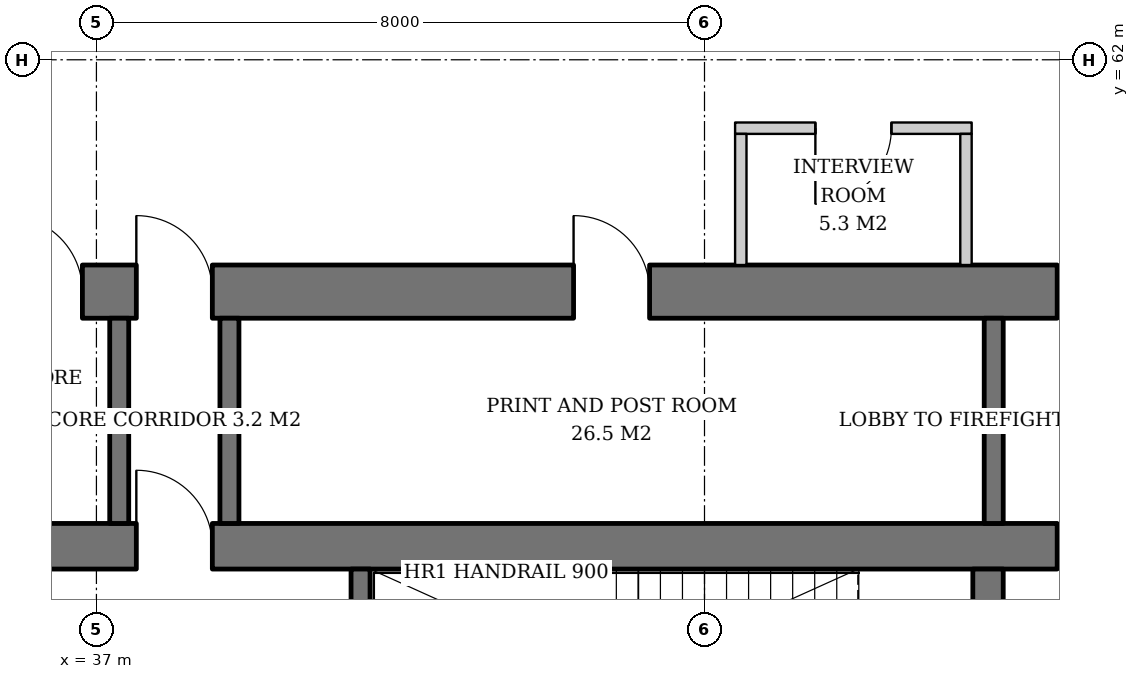
"""IFC4 building model, lengths in metres.
Left out: names, types, materials, properties, quantities, classifications, styles, units other than length and angle.
Written with IfcOpenShell. Run it as: python <this file> out.ifc"""

import sys

from ifc_helpers import new_model, si_unit, direction, frame, frame_2d, origin, place, context, subcontext, project, spatial, rectangle, extrude, element, fill, save


model = new_model("IFC4")
c1 = context("Model", 3, precision=1e-05, world=origin(), true_north=direction((0.0, 1.0)))
c2 = subcontext(c1, "Body", "Model", "MODEL_VIEW")
j1 = project(units=[si_unit("LENGTHUNIT", "METRE"), si_unit("PLANEANGLEUNIT", "RADIAN")], contexts=[c1])
p1 = place(None, origin())
s1 = spatial("IfcSite", under=j1, at=p1, CompositionType="ELEMENT")
p2 = place(p1, origin())
s2 = spatial("IfcBuilding", under=s1, at=p2, CompositionType="ELEMENT")
p3 = place(p2, frame((0.0, 0.0, 108.4)))
s3 = spatial("IfcBuildingStorey", under=s2, at=p3, CompositionType="ELEMENT", Elevation=108.4)
p4 = place(p3, frame((35.1, 55.6, 0.0), z_axis=(0.0, 0.0, 1.0), x_axis=(1.0, 0.0, 0.0)))
e1 = element("IfcWall", 1, at=p4, inside=s3, PredefinedType="SHEAR", context=c2, shape_type="SweptSolid", body=[
    extrude(rectangle(XDim=19.8, YDim=0.6, at=frame_2d((9.9, 0.0))), origin(), (0.0, 0.0, 1.0), 3.8),
])
p5 = place(p4, frame((14.54, 0.0, 0.0)))
e2 = element("IfcOpeningElement", 2, at=p5, cuts=e1, PredefinedType="OPENING", context=c2, shape_type="SweptSolid", body=[
    extrude(rectangle(XDim=1.0, YDim=2.1, at=frame_2d((0.5, 1.05))), frame((0.0, 0.31, 0.0), z_axis=(0.0, -1.0, 0.0), x_axis=(1.0, 0.0, 0.0)), (0.0, 0.0, 1.0), 0.62),
])
p6 = place(p4, frame((2.425, 0.0, 0.0)))
e3 = element("IfcOpeningElement", 3, at=p6, cuts=e1, PredefinedType="OPENING", context=c2, shape_type="SweptSolid", body=[
    extrude(rectangle(XDim=1.0, YDim=2.1, at=frame_2d((0.5, 1.05))), frame((0.0, 0.31, 0.0), z_axis=(0.0, -1.0, 0.0), x_axis=(1.0, 0.0, 0.0)), (0.0, 0.0, 1.0), 0.62),
])
p7 = place(p3, frame((31.7, 58.95, 0.0), z_axis=(0.0, 0.0, 1.0), x_axis=(1.0, 0.0, 0.0)))
e4 = element("IfcWall", 4, at=p7, inside=s3, PredefinedType="SHEAR", context=c2, shape_type="SweptSolid", body=[
    extrude(rectangle(XDim=26.6, YDim=0.7, at=frame_2d((13.3, 0.0))), origin(), (0.0, 0.0, 1.0), 3.8),
])
p8 = place(p7, frame((17.94, 0.0, 0.0)))
e5 = element("IfcOpeningElement", 5, at=p8, cuts=e4, PredefinedType="OPENING", context=c2, shape_type="SweptSolid", body=[
    extrude(rectangle(XDim=1.0, YDim=2.1, at=frame_2d((0.5, 1.05))), frame((0.0, 0.36, 0.0), z_axis=(0.0, -1.0, 0.0), x_axis=(1.0, 0.0, 0.0)), (0.0, 0.0, 1.0), 0.72),
])
p9 = place(p7, frame((5.825, 0.0, 0.0)))
e6 = element("IfcOpeningElement", 6, at=p9, cuts=e4, PredefinedType="OPENING", context=c2, shape_type="SweptSolid", body=[
    extrude(rectangle(XDim=1.0, YDim=2.1, at=frame_2d((0.5, 1.05))), frame((0.0, 0.36, 0.0), z_axis=(0.0, -1.0, 0.0), x_axis=(1.0, 0.0, 0.0)), (0.0, 0.0, 1.0), 0.72),
])
p10 = place(p7, frame((1.85, 0.0, 0.0)))
e7 = element("IfcOpeningElement", 7, at=p10, cuts=e4, PredefinedType="OPENING", context=c2, shape_type="SweptSolid", body=[
    extrude(rectangle(XDim=1.0, YDim=2.1, at=frame_2d((0.5, 1.05))), frame((0.0, 0.36, 0.0), z_axis=(0.0, -1.0, 0.0), x_axis=(1.0, 0.0, 0.0)), (0.0, 0.0, 1.0), 0.72),
])
p11 = place(p7, frame((4.115, 0.0, 0.0)))
e8 = element("IfcOpeningElement", 8, at=p11, cuts=e4, PredefinedType="OPENING", context=c2, shape_type="SweptSolid", body=[
    extrude(rectangle(XDim=1.0, YDim=2.1, at=frame_2d((0.5, 1.05))), frame((0.0, 0.36, 0.0), z_axis=(0.0, -1.0, 0.0), x_axis=(1.0, 0.0, 0.0)), (0.0, 0.0, 1.0), 0.72),
])
p12 = place(p7, frame((11.577, 0.0, 0.0)))
e9 = element("IfcOpeningElement", 9, at=p12, cuts=e4, PredefinedType="OPENING", context=c2, shape_type="SweptSolid", body=[
    extrude(rectangle(XDim=1.0, YDim=2.1, at=frame_2d((0.5, 1.05))), frame((0.0, 0.36, 0.0), z_axis=(0.0, -1.0, 0.0), x_axis=(1.0, 0.0, 0.0)), (0.0, 0.0, 1.0), 0.72),
])
p13 = place(p7, frame((20.9, 0.0, 0.0)))
e10 = element("IfcOpeningElement", 10, at=p13, cuts=e4, PredefinedType="OPENING", context=c2, shape_type="SweptSolid", body=[
    extrude(rectangle(XDim=1.0, YDim=2.1, at=frame_2d((0.5, 1.05))), frame((0.0, 0.36, 0.0), z_axis=(0.0, -1.0, 0.0), x_axis=(1.0, 0.0, 0.0)), (0.0, 0.0, 1.0), 0.72),
])
p14 = place(p7, frame((23.75, 0.0, 0.0)))
e11 = element("IfcOpeningElement", 11, at=p14, cuts=e4, PredefinedType="OPENING", context=c2, shape_type="SweptSolid", body=[
    extrude(rectangle(XDim=1.0, YDim=2.1, at=frame_2d((0.5, 1.05))), frame((0.0, 0.36, 0.0), z_axis=(0.0, -1.0, 0.0), x_axis=(1.0, 0.0, 0.0)), (0.0, 0.0, 1.0), 0.72),
])
p15 = place(p3, frame((48.73, 52.4, 0.0), z_axis=(0.0, 0.0, 1.0), x_axis=(0.0, 1.0, 0.0)))
e12 = element("IfcWall", 12, at=p15, inside=s3, PredefinedType="SHEAR", context=c2, shape_type="SweptSolid", body=[
    extrude(rectangle(XDim=2.9, YDim=0.4, at=frame_2d((1.45, 0.0))), origin(), (0.0, 0.0, 1.0), 3.8),
])
p16 = place(p15, frame((0.3, 0.0, 0.0)))
e13 = element("IfcOpeningElement", 13, at=p16, cuts=e12, PredefinedType="OPENING", context=c2, shape_type="SweptSolid", body=[
    extrude(rectangle(XDim=1.0, YDim=2.1, at=frame_2d((0.5, 1.05))), frame((0.0, 0.21, 0.0), z_axis=(0.0, -1.0, 0.0), x_axis=(1.0, 0.0, 0.0)), (0.0, 0.0, 1.0), 0.42),
])
p17 = place(p3, frame((40.475, 52.4, 0.0), z_axis=(0.0, 0.0, 1.0), x_axis=(0.0, 1.0, 0.0)))
e14 = element("IfcWall", 14, at=p17, inside=s3, PredefinedType="SHEAR", context=c2, shape_type="SweptSolid", body=[
    extrude(rectangle(XDim=2.9, YDim=0.25, at=frame_2d((1.45, 0.0))), origin(), (0.0, 0.0, 1.0), 3.8),
])
for number, where, z_axis, x_axis in (
    (15, (48.805, 55.9, 0.0), (0.0, 0.0, 1.0), (0.0, 1.0, 0.0)),
    (16, (37.3, 55.9, 0.0), (0.0, 0.0, 1.0), (0.0, 1.0, 0.0)),
    (17, (38.75, 55.9, 0.0), (0.0, 0.0, 1.0), (0.0, 1.0, 0.0)),
):
    element("IfcWall", number, at=place(p3, frame(where, z_axis=z_axis, x_axis=x_axis)), inside=s3, PredefinedType="SOLIDWALL", context=c2, shape_type="SweptSolid", body=[
        extrude(rectangle(XDim=2.7, YDim=0.25, at=frame_2d((1.35, 0.0))), origin(), (0.0, 0.0, 1.0), 3.62),
    ])
p18 = place(p3, frame((48.515, 61.1, 0.0), z_axis=(0.0, 0.0, 1.0), x_axis=(-1.0, 0.0, 0.0)))
e18 = element("IfcWall", 18, at=p18, inside=s3, PredefinedType="PARTITIONING", context=c2, shape_type="SweptSolid", body=[
    extrude(rectangle(XDim=3.112, YDim=0.15, at=frame_2d((1.556, 0.0))), origin(), (0.0, 0.0, 1.0), 3.62),
])
p19 = place(p18, frame((1.056, 0.0, 0.0)))
e19 = element("IfcOpeningElement", 19, at=p19, cuts=e18, PredefinedType="OPENING", context=c2, shape_type="SweptSolid", body=[
    extrude(rectangle(XDim=1.0, YDim=2.1, at=frame_2d((0.5, 1.05))), frame((0.0, 0.085, 0.0), z_axis=(0.0, -1.0, 0.0), x_axis=(1.0, 0.0, 0.0)), (0.0, 0.0, 1.0), 0.17),
])
for number, where, z_axis, x_axis in (
    (20, (48.44, 59.3, 0.0), (0.0, 0.0, 1.0), (0.0, 1.0, 0.0)),
    (21, (45.478, 59.3, 0.0), (0.0, 0.0, 1.0), (0.0, 1.0, 0.0)),
):
    element("IfcWall", number, at=place(p3, frame(where, z_axis=z_axis, x_axis=x_axis)), inside=s3, PredefinedType="PARTITIONING", context=c2, shape_type="SweptSolid", body=[
        extrude(rectangle(XDim=1.725, YDim=0.15, at=frame_2d((0.862, 0.0))), origin(), (0.0, 0.0, 1.0), 3.62),
    ])
p20 = place(p5, origin())
e22 = element("IfcDoor", 22, at=p20, inside=s3, OperationType="SINGLE_SWING_RIGHT", PredefinedType="DOOR", context=c2, shape_type="SweptSolid", body=[
    extrude(rectangle(XDim=1.0, YDim=2.1, at=frame_2d((0.5, 1.05))), frame((0.0, 0.025, 0.0), z_axis=(0.0, -1.0, 0.0), x_axis=(1.0, 0.0, 0.0)), (0.0, 0.0, 1.0), 0.05),
])
fill(e2, e22)
p21 = place(p8, origin())
e23 = element("IfcDoor", 23, at=p21, inside=s3, OperationType="SINGLE_SWING_RIGHT", PredefinedType="DOOR", context=c2, shape_type="SweptSolid", body=[
    extrude(rectangle(XDim=1.0, YDim=2.1, at=frame_2d((0.5, 1.05))), frame((0.0, 0.025, 0.0), z_axis=(0.0, -1.0, 0.0), x_axis=(1.0, 0.0, 0.0)), (0.0, 0.0, 1.0), 0.05),
])
fill(e5, e23)
p22 = place(p9, origin())
e24 = element("IfcDoor", 24, at=p22, inside=s3, OperationType="SINGLE_SWING_LEFT", PredefinedType="DOOR", context=c2, shape_type="SweptSolid", body=[
    extrude(rectangle(XDim=1.0, YDim=2.1, at=frame_2d((0.5, 1.05))), frame((0.0, 0.025, 0.0), z_axis=(0.0, -1.0, 0.0), x_axis=(1.0, 0.0, 0.0)), (0.0, 0.0, 1.0), 0.05),
])
fill(e6, e24)
p23 = place(p6, origin())
e25 = element("IfcDoor", 25, at=p23, inside=s3, OperationType="SINGLE_SWING_LEFT", PredefinedType="DOOR", context=c2, shape_type="SweptSolid", body=[
    extrude(rectangle(XDim=1.0, YDim=2.1, at=frame_2d((0.5, 1.05))), frame((0.0, -0.24, 0.0), z_axis=(0.0, -1.0, 0.0), x_axis=(1.0, 0.0, 0.0)), (0.0, 0.0, 1.0), 0.05),
])
fill(e3, e25)
p24 = place(p11, origin())
e26 = element("IfcDoor", 26, at=p24, inside=s3, OperationType="SINGLE_SWING_LEFT", PredefinedType="DOOR", context=c2, shape_type="SweptSolid", body=[
    extrude(rectangle(XDim=1.0, YDim=2.1, at=frame_2d((0.5, 1.05))), frame((0.0, -0.29, 0.0), z_axis=(0.0, -1.0, 0.0), x_axis=(1.0, 0.0, 0.0)), (0.0, 0.0, 1.0), 0.05),
])
fill(e8, e26)
p25 = place(p12, origin())
e27 = element("IfcDoor", 27, at=p25, inside=s3, OperationType="SINGLE_SWING_LEFT", PredefinedType="DOOR", context=c2, shape_type="SweptSolid", body=[
    extrude(rectangle(XDim=1.0, YDim=2.1, at=frame_2d((0.5, 1.05))), frame((0.0, -0.29, 0.0), z_axis=(0.0, -1.0, 0.0), x_axis=(1.0, 0.0, 0.0)), (0.0, 0.0, 1.0), 0.05),
])
fill(e9, e27)
p26 = place(p19, origin())
e28 = element("IfcDoor", 28, at=p26, inside=s3, OperationType="SINGLE_SWING_RIGHT", PredefinedType="DOOR", context=c2, shape_type="SweptSolid", body=[
    extrude(rectangle(XDim=1.0, YDim=2.1, at=frame_2d((0.5, 1.05))), frame((0.0, 0.025, 0.0), z_axis=(0.0, -1.0, 0.0), x_axis=(1.0, 0.0, 0.0)), (0.0, 0.0, 1.0), 0.05),
])
fill(e19, e28)
save(model, sys.argv[1])
